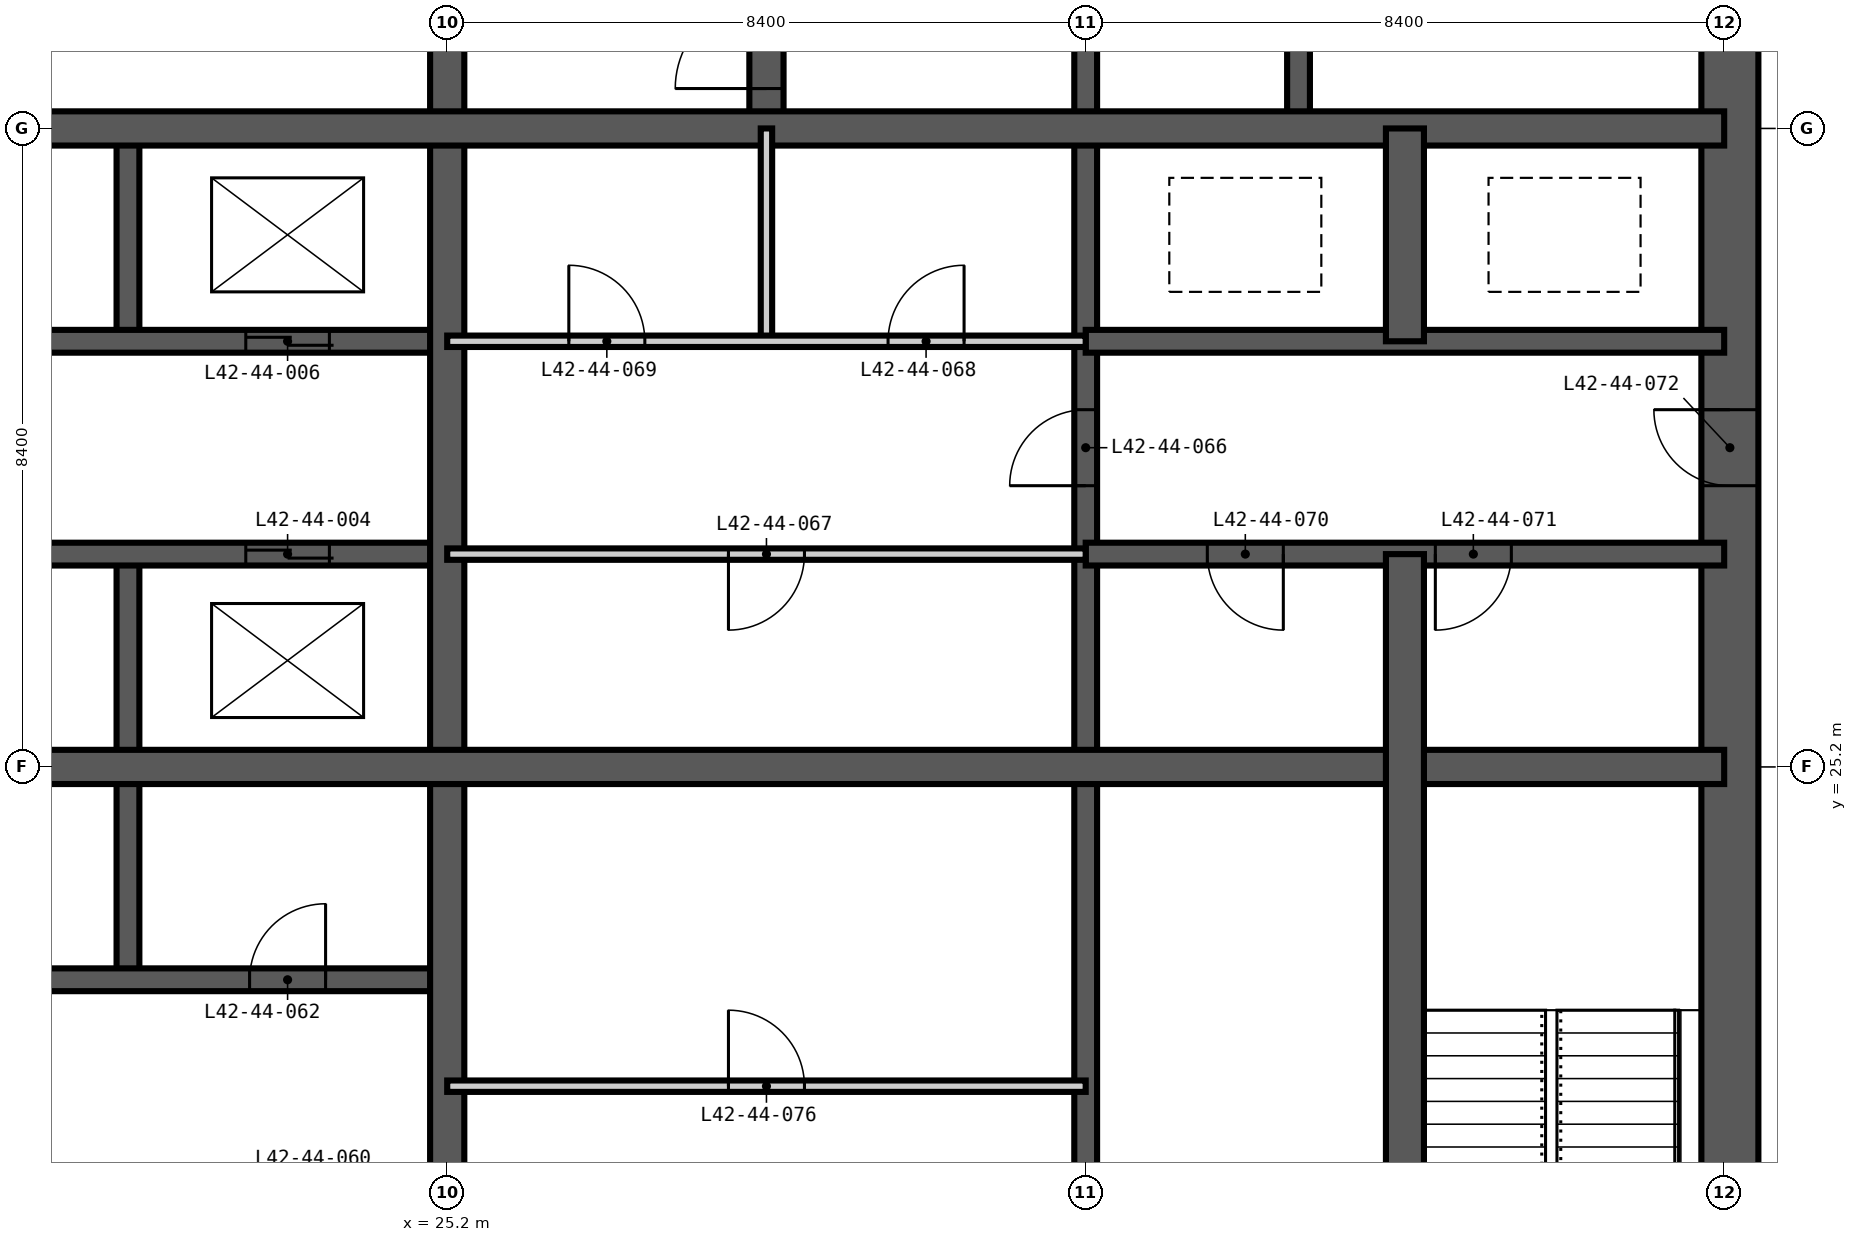
"""IFC4 building model, lengths in metres.
Left out: names, types, materials, properties, quantities, classifications, styles, units other than length and angle.
Written with IfcOpenShell. Run it as: python <this file> out.ifc"""

import sys

from ifc_helpers import new_model, si_unit, direction, frame, frame_2d, origin, place, context, subcontext, project, spatial, rectangle, extrude, element, fill, save


model = new_model("IFC4")
c1 = context("Model", 3, precision=1e-05, world=origin(), true_north=direction((0.0, 1.0)))
c2 = subcontext(c1, "Body", "Model", "MODEL_VIEW")
j1 = project(units=[si_unit("LENGTHUNIT", "METRE"), si_unit("PLANEANGLEUNIT", "RADIAN")], contexts=[c1])
p1 = place(None, origin())
s1 = spatial("IfcSite", under=j1, at=p1, CompositionType="ELEMENT")
p2 = place(p1, origin())
s2 = spatial("IfcBuilding", under=s1, at=p2, CompositionType="ELEMENT")
p3 = place(p2, frame((0.0, 0.0, 166.2)))
s3 = spatial("IfcBuildingStorey", under=s2, at=p3, CompositionType="ELEMENT", Elevation=166.2)
p4 = place(p3, frame((42.075, 17.1, -0.35), z_axis=(0.0, 0.0, 1.0), x_axis=(0.0, 1.0, 0.0)))
e1 = element("IfcWall", 1, at=p4, inside=s3, PredefinedType="SHEAR", context=c2, shape_type="SweptSolid", body=[
    extrude(rectangle(XDim=24.6, YDim=0.75, at=frame_2d((12.3, 0.0))), origin(), (0.0, 0.0, 1.0), 3.6),
])
p5 = place(p4, frame((0.5, 0.0, 0.35)))
e2 = element("IfcOpeningElement", 2, at=p5, cuts=e1, PredefinedType="OPENING", context=c2, shape_type="SweptSolid", body=[
    extrude(rectangle(XDim=1.2, YDim=2.2, at=frame_2d((0.6, 1.1))), frame((0.0, 0.385, 0.0), z_axis=(0.0, -1.0, 0.0), x_axis=(1.0, 0.0, 0.0)), (0.0, 0.0, 1.0), 0.77),
])
p6 = place(p4, frame((11.8, 0.0, 0.35)))
e3 = element("IfcOpeningElement", 3, at=p6, cuts=e1, PredefinedType="OPENING", context=c2, shape_type="SweptSolid", body=[
    extrude(rectangle(XDim=1.0, YDim=2.1, at=frame_2d((0.5, 1.05))), frame((0.0, 0.385, 0.0), z_axis=(0.0, -1.0, 0.0), x_axis=(1.0, 0.0, 0.0)), (0.0, 0.0, 1.0), 0.77),
])
p7 = place(p4, frame((20.2, 0.0, 0.35)))
e4 = element("IfcOpeningElement", 4, at=p7, cuts=e1, PredefinedType="OPENING", context=c2, shape_type="SweptSolid", body=[
    extrude(rectangle(XDim=1.0, YDim=2.1, at=frame_2d((0.5, 1.05))), frame((0.0, 0.385, 0.0), z_axis=(0.0, -1.0, 0.0), x_axis=(1.0, 0.0, 0.0)), (0.0, 0.0, 1.0), 0.77),
])
p8 = place(p3, frame((21.0, 22.4, -0.35), z_axis=(0.0, 0.0, 1.0), x_axis=(0.0, 1.0, 0.0)))
e5 = element("IfcWall", 5, at=p8, inside=s3, PredefinedType="SHEAR", context=c2, shape_type="SweptSolid", body=[
    extrude(rectangle(XDim=5.6, YDim=0.3, at=frame_2d((2.8, 0.0))), origin(), (0.0, 0.0, 1.0), 3.6),
])
p9 = place(p3, frame((21.0, 30.8, -0.35), z_axis=(0.0, 0.0, 1.0), x_axis=(0.0, 1.0, 0.0)))
e6 = element("IfcWall", 6, at=p9, inside=s3, PredefinedType="SHEAR", context=c2, shape_type="SweptSolid", body=[
    extrude(rectangle(XDim=2.8, YDim=0.3, at=frame_2d((1.4, 0.0))), origin(), (0.0, 0.0, 1.0), 3.6),
])
p10 = place(p3, frame((33.6, 16.8, -0.35), z_axis=(0.0, 0.0, 1.0), x_axis=(0.0, 1.0, 0.0)))
e7 = element("IfcWall", 7, at=p10, inside=s3, PredefinedType="SHEAR", context=c2, shape_type="SweptSolid", body=[
    extrude(rectangle(XDim=25.2, YDim=0.3, at=frame_2d((12.6, 0.0))), origin(), (0.0, 0.0, 1.0), 3.6),
])
p11 = place(p10, frame((22.5, 0.0, 0.35)))
e8 = element("IfcOpeningElement", 8, at=p11, cuts=e7, PredefinedType="OPENING", context=c2, shape_type="SweptSolid", body=[
    extrude(rectangle(XDim=1.2, YDim=2.2, at=frame_2d((0.6, 1.1))), frame((0.0, 0.16, 0.0), z_axis=(0.0, -1.0, 0.0), x_axis=(1.0, 0.0, 0.0)), (0.0, 0.0, 1.0), 0.32),
])
p12 = place(p10, frame((18.3, 0.0, 0.35)))
e9 = element("IfcOpeningElement", 9, at=p12, cuts=e7, PredefinedType="OPENING", context=c2, shape_type="SweptSolid", body=[
    extrude(rectangle(XDim=1.2, YDim=2.2, at=frame_2d((0.6, 1.1))), frame((0.0, 0.16, 0.0), z_axis=(0.0, -1.0, 0.0), x_axis=(1.0, 0.0, 0.0)), (0.0, 0.0, 1.0), 0.32),
])
p13 = place(p10, frame((12.1, 0.0, 0.35)))
e10 = element("IfcOpeningElement", 10, at=p13, cuts=e7, PredefinedType="OPENING", context=c2, shape_type="SweptSolid", body=[
    extrude(rectangle(XDim=1.0, YDim=2.1, at=frame_2d((0.5, 1.05))), frame((0.0, 0.16, 0.0), z_axis=(0.0, -1.0, 0.0), x_axis=(1.0, 0.0, 0.0)), (0.0, 0.0, 1.0), 0.32),
])
p14 = place(p3, frame((36.4, 33.6, -0.35), z_axis=(0.0, 0.0, 1.0), x_axis=(0.0, 1.0, 0.0)))
e11 = element("IfcWall", 11, at=p14, inside=s3, PredefinedType="SHEAR", context=c2, shape_type="SweptSolid", body=[
    extrude(rectangle(XDim=8.4, YDim=0.3, at=frame_2d((4.2, 0.0))), origin(), (0.0, 0.0, 1.0), 3.6),
])
p15 = place(p3, frame((16.8, 22.4, -0.35), z_axis=(0.0, 0.0, 1.0), x_axis=(1.0, 0.0, 0.0)))
e12 = element("IfcWall", 12, at=p15, inside=s3, PredefinedType="SHEAR", context=c2, shape_type="SweptSolid", body=[
    extrude(rectangle(XDim=8.4, YDim=0.3, at=frame_2d((4.2, 0.0))), origin(), (0.0, 0.0, 1.0), 3.6),
])
p16 = place(p15, frame((1.6, 0.0, 0.35)))
e13 = element("IfcOpeningElement", 13, at=p16, cuts=e12, PredefinedType="OPENING", context=c2, shape_type="SweptSolid", body=[
    extrude(rectangle(XDim=1.0, YDim=2.1, at=frame_2d((0.5, 1.05))), frame((0.0, 0.16, 0.0), z_axis=(0.0, -1.0, 0.0), x_axis=(1.0, 0.0, 0.0)), (0.0, 0.0, 1.0), 0.32),
])
p17 = place(p15, frame((5.8, 0.0, 0.35)))
e14 = element("IfcOpeningElement", 14, at=p17, cuts=e12, PredefinedType="OPENING", context=c2, shape_type="SweptSolid", body=[
    extrude(rectangle(XDim=1.0, YDim=2.1, at=frame_2d((0.5, 1.05))), frame((0.0, 0.16, 0.0), z_axis=(0.0, -1.0, 0.0), x_axis=(1.0, 0.0, 0.0)), (0.0, 0.0, 1.0), 0.32),
])
p18 = place(p3, frame((16.8, 28.0, -0.35), z_axis=(0.0, 0.0, 1.0), x_axis=(1.0, 0.0, 0.0)))
e15 = element("IfcWall", 15, at=p18, inside=s3, PredefinedType="SHEAR", context=c2, shape_type="SweptSolid", body=[
    extrude(rectangle(XDim=8.4, YDim=0.3, at=frame_2d((4.2, 0.0))), origin(), (0.0, 0.0, 1.0), 3.6),
])
p19 = place(p18, frame((1.55, 0.0, 0.35)))
e16 = element("IfcOpeningElement", 16, at=p19, cuts=e15, PredefinedType="OPENING", context=c2, shape_type="SweptSolid", body=[
    extrude(rectangle(XDim=1.1, YDim=2.2, at=frame_2d((0.55, 1.1))), frame((0.0, 0.16, 0.0), z_axis=(0.0, -1.0, 0.0), x_axis=(1.0, 0.0, 0.0)), (0.0, 0.0, 1.0), 0.32),
])
p20 = place(p18, frame((5.75, 0.0, 0.35)))
e17 = element("IfcOpeningElement", 17, at=p20, cuts=e15, PredefinedType="OPENING", context=c2, shape_type="SweptSolid", body=[
    extrude(rectangle(XDim=1.1, YDim=2.2, at=frame_2d((0.55, 1.1))), frame((0.0, 0.16, 0.0), z_axis=(0.0, -1.0, 0.0), x_axis=(1.0, 0.0, 0.0)), (0.0, 0.0, 1.0), 0.32),
])
p21 = place(p3, frame((33.6, 28.0, -0.35), z_axis=(0.0, 0.0, 1.0), x_axis=(1.0, 0.0, 0.0)))
e18 = element("IfcWall", 18, at=p21, inside=s3, PredefinedType="SHEAR", context=c2, shape_type="SweptSolid", body=[
    extrude(rectangle(XDim=8.4, YDim=0.3, at=frame_2d((4.2, 0.0))), origin(), (0.0, 0.0, 1.0), 3.6),
])
p22 = place(p21, frame((1.6, 0.0, 0.35)))
e19 = element("IfcOpeningElement", 19, at=p22, cuts=e18, PredefinedType="OPENING", context=c2, shape_type="SweptSolid", body=[
    extrude(rectangle(XDim=1.0, YDim=2.1, at=frame_2d((0.5, 1.05))), frame((0.0, 0.16, 0.0), z_axis=(0.0, -1.0, 0.0), x_axis=(1.0, 0.0, 0.0)), (0.0, 0.0, 1.0), 0.32),
])
p23 = place(p21, frame((4.6, 0.0, 0.35)))
e20 = element("IfcOpeningElement", 20, at=p23, cuts=e18, PredefinedType="OPENING", context=c2, shape_type="SweptSolid", body=[
    extrude(rectangle(XDim=1.0, YDim=2.1, at=frame_2d((0.5, 1.05))), frame((0.0, 0.16, 0.0), z_axis=(0.0, -1.0, 0.0), x_axis=(1.0, 0.0, 0.0)), (0.0, 0.0, 1.0), 0.32),
])
p24 = place(p3, frame((16.8, 30.8, -0.35), z_axis=(0.0, 0.0, 1.0), x_axis=(1.0, 0.0, 0.0)))
e21 = element("IfcWall", 21, at=p24, inside=s3, PredefinedType="SHEAR", context=c2, shape_type="SweptSolid", body=[
    extrude(rectangle(XDim=8.4, YDim=0.3, at=frame_2d((4.2, 0.0))), origin(), (0.0, 0.0, 1.0), 3.6),
])
p25 = place(p24, frame((1.55, 0.0, 0.35)))
e22 = element("IfcOpeningElement", 22, at=p25, cuts=e21, PredefinedType="OPENING", context=c2, shape_type="SweptSolid", body=[
    extrude(rectangle(XDim=1.1, YDim=2.2, at=frame_2d((0.55, 1.1))), frame((0.0, 0.16, 0.0), z_axis=(0.0, -1.0, 0.0), x_axis=(1.0, 0.0, 0.0)), (0.0, 0.0, 1.0), 0.32),
])
p26 = place(p24, frame((5.75, 0.0, 0.35)))
e23 = element("IfcOpeningElement", 23, at=p26, cuts=e21, PredefinedType="OPENING", context=c2, shape_type="SweptSolid", body=[
    extrude(rectangle(XDim=1.1, YDim=2.2, at=frame_2d((0.55, 1.1))), frame((0.0, 0.16, 0.0), z_axis=(0.0, -1.0, 0.0), x_axis=(1.0, 0.0, 0.0)), (0.0, 0.0, 1.0), 0.32),
])
p27 = place(p3, frame((33.6, 30.8, -0.35), z_axis=(0.0, 0.0, 1.0), x_axis=(1.0, 0.0, 0.0)))
e24 = element("IfcWall", 24, at=p27, inside=s3, PredefinedType="SHEAR", context=c2, shape_type="SweptSolid", body=[
    extrude(rectangle(XDim=8.4, YDim=0.3, at=frame_2d((4.2, 0.0))), origin(), (0.0, 0.0, 1.0), 3.6),
])
p28 = place(p3, frame((25.2, 16.8, -0.35), z_axis=(0.0, 0.0, 1.0), x_axis=(0.0, 1.0, 0.0)))
e25 = element("IfcWall", 25, at=p28, inside=s3, PredefinedType="SHEAR", context=c2, shape_type="SweptSolid", body=[
    extrude(rectangle(XDim=25.2, YDim=0.45, at=frame_2d((12.6, 0.0))), origin(), (0.0, 0.0, 1.0), 3.6),
])
p29 = place(p3, frame((29.4, 33.6, -0.35), z_axis=(0.0, 0.0, 1.0), x_axis=(0.0, 1.0, 0.0)))
e26 = element("IfcWall", 26, at=p29, inside=s3, PredefinedType="SHEAR", context=c2, shape_type="SweptSolid", body=[
    extrude(rectangle(XDim=8.4, YDim=0.45, at=frame_2d((4.2, 0.0))), origin(), (0.0, 0.0, 1.0), 3.6),
])
p30 = place(p29, frame((0.525, 0.0, 0.35)))
e27 = element("IfcOpeningElement", 27, at=p30, cuts=e26, PredefinedType="OPENING", context=c2, shape_type="SweptSolid", body=[
    extrude(rectangle(XDim=1.2, YDim=2.2, at=frame_2d((0.6, 1.1))), frame((0.0, 0.235, 0.0), z_axis=(0.0, -1.0, 0.0), x_axis=(1.0, 0.0, 0.0)), (0.0, 0.0, 1.0), 0.47),
])
for number, where, z_axis, x_axis in (
    (28, (16.8, 25.2, -0.35), (0.0, 0.0, 1.0), (1.0, 0.0, 0.0)),
    (29, (16.8, 33.6, -0.35), (0.0, 0.0, 1.0), (1.0, 0.0, 0.0)),
):
    element("IfcWall", number, at=place(p3, frame(where, z_axis=z_axis, x_axis=x_axis)), inside=s3, PredefinedType="SHEAR", context=c2, shape_type="SweptSolid", body=[
        extrude(rectangle(XDim=25.2, YDim=0.45, at=frame_2d((12.6, 0.0))), origin(), (0.0, 0.0, 1.0), 3.6),
    ])
p31 = place(p3, frame((37.8, 16.8, -0.35), z_axis=(0.0, 0.0, 1.0), x_axis=(0.0, 1.0, 0.0)))
e30 = element("IfcWall", 30, at=p31, inside=s3, PredefinedType="SHEAR", context=c2, shape_type="SweptSolid", body=[
    extrude(rectangle(XDim=11.2, YDim=0.5, at=frame_2d((5.6, 0.0))), origin(), (0.0, 0.0, 1.0), 3.6),
])
p32 = place(p3, frame((37.8, 30.8, -0.35), z_axis=(0.0, 0.0, 1.0), x_axis=(0.0, 1.0, 0.0)))
e31 = element("IfcWall", 31, at=p32, inside=s3, PredefinedType="SHEAR", context=c2, shape_type="SweptSolid", body=[
    extrude(rectangle(XDim=2.8, YDim=0.5, at=frame_2d((1.4, 0.0))), origin(), (0.0, 0.0, 1.0), 3.6),
])
p33 = place(p3, frame((29.4, 30.8, 0.0), z_axis=(0.0, 0.0, 1.0), x_axis=(0.0, 1.0, 0.0)))
e32 = element("IfcWall", 32, at=p33, inside=s3, PredefinedType="PARTITIONING", context=c2, shape_type="SweptSolid", body=[
    extrude(rectangle(XDim=2.8, YDim=0.15, at=frame_2d((1.4, 0.0))), origin(), (0.0, 0.0, 1.0), 3.25),
])
p34 = place(p3, frame((25.2, 21.0, 0.0), z_axis=(0.0, 0.0, 1.0), x_axis=(1.0, 0.0, 0.0)))
e33 = element("IfcWall", 33, at=p34, inside=s3, PredefinedType="PARTITIONING", context=c2, shape_type="SweptSolid", body=[
    extrude(rectangle(XDim=8.4, YDim=0.15, at=frame_2d((4.2, 0.0))), origin(), (0.0, 0.0, 1.0), 3.25),
])
p35 = place(p34, frame((3.7, 0.0, 0.0)))
e34 = element("IfcOpeningElement", 34, at=p35, cuts=e33, PredefinedType="OPENING", context=c2, shape_type="SweptSolid", body=[
    extrude(rectangle(XDim=1.0, YDim=2.1, at=frame_2d((0.5, 1.05))), frame((0.0, 0.085, 0.0), z_axis=(0.0, -1.0, 0.0), x_axis=(1.0, 0.0, 0.0)), (0.0, 0.0, 1.0), 0.17),
])
p36 = place(p3, frame((25.2, 28.0, 0.0), z_axis=(0.0, 0.0, 1.0), x_axis=(1.0, 0.0, 0.0)))
e35 = element("IfcWall", 35, at=p36, inside=s3, PredefinedType="PARTITIONING", context=c2, shape_type="SweptSolid", body=[
    extrude(rectangle(XDim=8.4, YDim=0.15, at=frame_2d((4.2, 0.0))), origin(), (0.0, 0.0, 1.0), 3.25),
])
p37 = place(p36, frame((3.7, 0.0, 0.0)))
e36 = element("IfcOpeningElement", 36, at=p37, cuts=e35, PredefinedType="OPENING", context=c2, shape_type="SweptSolid", body=[
    extrude(rectangle(XDim=1.0, YDim=2.1, at=frame_2d((0.5, 1.05))), frame((0.0, 0.085, 0.0), z_axis=(0.0, -1.0, 0.0), x_axis=(1.0, 0.0, 0.0)), (0.0, 0.0, 1.0), 0.17),
])
p38 = place(p3, frame((25.2, 30.8, 0.0), z_axis=(0.0, 0.0, 1.0), x_axis=(1.0, 0.0, 0.0)))
e37 = element("IfcWall", 37, at=p38, inside=s3, PredefinedType="PARTITIONING", context=c2, shape_type="SweptSolid", body=[
    extrude(rectangle(XDim=8.4, YDim=0.15, at=frame_2d((4.2, 0.0))), origin(), (0.0, 0.0, 1.0), 3.25),
])
p39 = place(p38, frame((5.8, 0.0, 0.0)))
e38 = element("IfcOpeningElement", 38, at=p39, cuts=e37, PredefinedType="OPENING", context=c2, shape_type="SweptSolid", body=[
    extrude(rectangle(XDim=1.0, YDim=2.1, at=frame_2d((0.5, 1.05))), frame((0.0, 0.085, 0.0), z_axis=(0.0, -1.0, 0.0), x_axis=(1.0, 0.0, 0.0)), (0.0, 0.0, 1.0), 0.17),
])
p40 = place(p38, frame((1.6, 0.0, 0.0)))
e39 = element("IfcOpeningElement", 39, at=p40, cuts=e37, PredefinedType="OPENING", context=c2, shape_type="SweptSolid", body=[
    extrude(rectangle(XDim=1.0, YDim=2.1, at=frame_2d((0.5, 1.05))), frame((0.0, 0.085, 0.0), z_axis=(0.0, -1.0, 0.0), x_axis=(1.0, 0.0, 0.0)), (0.0, 0.0, 1.0), 0.17),
])
p41 = place(p30, origin())
e40 = element("IfcDoor", 40, at=p41, inside=s3, OperationType="SINGLE_SWING_LEFT", PredefinedType="DOOR", context=c2, shape_type="SweptSolid", body=[
    extrude(rectangle(XDim=1.2, YDim=2.2, at=frame_2d((0.6, 1.1))), frame((0.0, 0.025, 0.0), z_axis=(0.0, -1.0, 0.0), x_axis=(1.0, 0.0, 0.0)), (0.0, 0.0, 1.0), 0.05),
])
fill(e27, e40)
p42 = place(p20, origin())
e41 = element("IfcDoor", 41, at=p42, inside=s3, OperationType="DOUBLE_DOOR_SLIDING", PredefinedType="DOOR", context=c2, shape_type="SweptSolid", body=[
    extrude(rectangle(XDim=1.1, YDim=2.2, at=frame_2d((0.55, 1.1))), frame((0.0, 0.025, 0.0), z_axis=(0.0, -1.0, 0.0), x_axis=(1.0, 0.0, 0.0)), (0.0, 0.0, 1.0), 0.05),
])
fill(e17, e41)
p43 = place(p26, origin())
e42 = element("IfcDoor", 42, at=p43, inside=s3, OperationType="DOUBLE_DOOR_SLIDING", PredefinedType="DOOR", context=c2, shape_type="SweptSolid", body=[
    extrude(rectangle(XDim=1.1, YDim=2.2, at=frame_2d((0.55, 1.1))), frame((0.0, 0.025, 0.0), z_axis=(0.0, -1.0, 0.0), x_axis=(1.0, 0.0, 0.0)), (0.0, 0.0, 1.0), 0.05),
])
fill(e23, e42)
p44 = place(p17, origin())
e43 = element("IfcDoor", 43, at=p44, inside=s3, OperationType="SINGLE_SWING_RIGHT", PredefinedType="DOOR", context=c2, shape_type="SweptSolid", body=[
    extrude(rectangle(XDim=1.0, YDim=2.1, at=frame_2d((0.5, 1.05))), frame((0.0, 0.025, 0.0), z_axis=(0.0, -1.0, 0.0), x_axis=(1.0, 0.0, 0.0)), (0.0, 0.0, 1.0), 0.05),
])
fill(e14, e43)
p45 = place(p13, origin())
e44 = element("IfcDoor", 44, at=p45, inside=s3, OperationType="SINGLE_SWING_LEFT", PredefinedType="DOOR", context=c2, shape_type="SweptSolid", body=[
    extrude(rectangle(XDim=1.0, YDim=2.1, at=frame_2d((0.5, 1.05))), frame((0.0, 0.025, 0.0), z_axis=(0.0, -1.0, 0.0), x_axis=(1.0, 0.0, 0.0)), (0.0, 0.0, 1.0), 0.05),
])
fill(e10, e44)
p46 = place(p37, frame((1.0, 0.0, 0.0), z_axis=(0.0, 0.0, 1.0), x_axis=(-1.0, 0.0, 0.0)))
e45 = element("IfcDoor", 45, at=p46, inside=s3, OperationType="SINGLE_SWING_RIGHT", PredefinedType="DOOR", context=c2, shape_type="SweptSolid", body=[
    extrude(rectangle(XDim=1.0, YDim=2.1, at=frame_2d((0.5, 1.05))), frame((0.0, 0.025, 0.0), z_axis=(0.0, -1.0, 0.0), x_axis=(1.0, 0.0, 0.0)), (0.0, 0.0, 1.0), 0.05),
])
fill(e36, e45)
p47 = place(p39, origin())
e46 = element("IfcDoor", 46, at=p47, inside=s3, OperationType="SINGLE_SWING_RIGHT", PredefinedType="DOOR", context=c2, shape_type="SweptSolid", body=[
    extrude(rectangle(XDim=1.0, YDim=2.1, at=frame_2d((0.5, 1.05))), frame((0.0, 0.025, 0.0), z_axis=(0.0, -1.0, 0.0), x_axis=(1.0, 0.0, 0.0)), (0.0, 0.0, 1.0), 0.05),
])
fill(e38, e46)
p48 = place(p40, origin())
e47 = element("IfcDoor", 47, at=p48, inside=s3, OperationType="SINGLE_SWING_LEFT", PredefinedType="DOOR", context=c2, shape_type="SweptSolid", body=[
    extrude(rectangle(XDim=1.0, YDim=2.1, at=frame_2d((0.5, 1.05))), frame((0.0, 0.025, 0.0), z_axis=(0.0, -1.0, 0.0), x_axis=(1.0, 0.0, 0.0)), (0.0, 0.0, 1.0), 0.05),
])
fill(e39, e47)
p49 = place(p22, frame((1.0, 0.0, 0.0), z_axis=(0.0, 0.0, 1.0), x_axis=(-1.0, 0.0, 0.0)))
e48 = element("IfcDoor", 48, at=p49, inside=s3, OperationType="SINGLE_SWING_LEFT", PredefinedType="DOOR", context=c2, shape_type="SweptSolid", body=[
    extrude(rectangle(XDim=1.0, YDim=2.1, at=frame_2d((0.5, 1.05))), frame((0.0, 0.025, 0.0), z_axis=(0.0, -1.0, 0.0), x_axis=(1.0, 0.0, 0.0)), (0.0, 0.0, 1.0), 0.05),
])
fill(e19, e48)
p50 = place(p23, frame((1.0, 0.0, 0.0), z_axis=(0.0, 0.0, 1.0), x_axis=(-1.0, 0.0, 0.0)))
e49 = element("IfcDoor", 49, at=p50, inside=s3, OperationType="SINGLE_SWING_RIGHT", PredefinedType="DOOR", context=c2, shape_type="SweptSolid", body=[
    extrude(rectangle(XDim=1.0, YDim=2.1, at=frame_2d((0.5, 1.05))), frame((0.0, 0.025, 0.0), z_axis=(0.0, -1.0, 0.0), x_axis=(1.0, 0.0, 0.0)), (0.0, 0.0, 1.0), 0.05),
])
fill(e20, e49)
p51 = place(p6, origin())
e50 = element("IfcDoor", 50, at=p51, inside=s3, OperationType="SINGLE_SWING_RIGHT", PredefinedType="DOOR", context=c2, shape_type="SweptSolid", body=[
    extrude(rectangle(XDim=1.0, YDim=2.1, at=frame_2d((0.5, 1.05))), frame((0.0, 0.025, 0.0), z_axis=(0.0, -1.0, 0.0), x_axis=(1.0, 0.0, 0.0)), (0.0, 0.0, 1.0), 0.05),
])
fill(e3, e50)
p52 = place(p35, origin())
e51 = element("IfcDoor", 51, at=p52, inside=s3, OperationType="SINGLE_SWING_LEFT", PredefinedType="DOOR", context=c2, shape_type="SweptSolid", body=[
    extrude(rectangle(XDim=1.0, YDim=2.1, at=frame_2d((0.5, 1.05))), frame((0.0, 0.025, 0.0), z_axis=(0.0, -1.0, 0.0), x_axis=(1.0, 0.0, 0.0)), (0.0, 0.0, 1.0), 0.05),
])
fill(e34, e51)
save(model, sys.argv[1])
